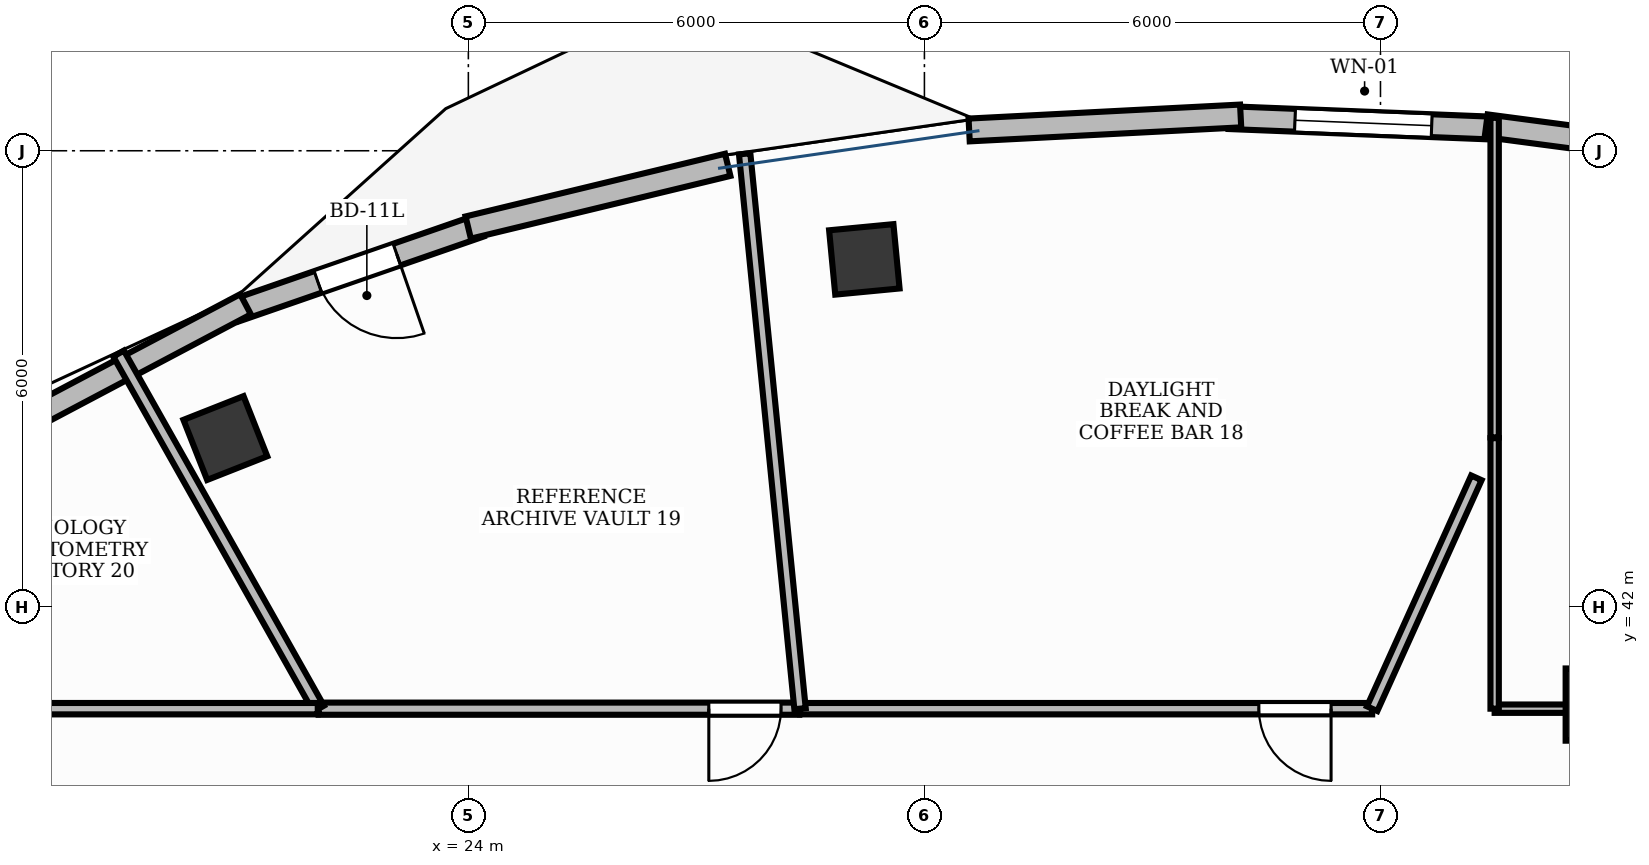
"""IFC4 building model, lengths in metres.
Left out: names, types, materials, properties, quantities, classifications, styles, units other than length and angle.
Written with IfcOpenShell. Run it as: python <this file> out.ifc"""

import sys

from ifc_helpers import new_model, si_unit, direction, frame, frame_2d, origin, origin_2d, place, context, subcontext, project, spatial, rectangle, extrude, element, fill, save


model = new_model("IFC4")
c1 = context("Model", 3, precision=1e-05, world=origin(), true_north=direction((0.0, 1.0)))
c2 = subcontext(c1, "Body", "Model", "MODEL_VIEW")
j1 = project(units=[si_unit("LENGTHUNIT", "METRE"), si_unit("PLANEANGLEUNIT", "RADIAN")], contexts=[c1])
p1 = place(None, origin())
s1 = spatial("IfcSite", under=j1, at=p1, CompositionType="ELEMENT")
p2 = place(p1, origin())
s2 = spatial("IfcBuilding", under=s1, at=p2, CompositionType="ELEMENT")
p3 = place(p2, frame((0.0, 0.0, 256.2)))
s3 = spatial("IfcBuildingStorey", under=s2, at=p3, CompositionType="ELEMENT", Elevation=256.2)
p4 = place(p3, frame((38.911, 40.714, -0.0), z_axis=(0.0, 0.0, 1.0), x_axis=(1.0, 0.0, 0.0)))
e1 = element("IfcColumn", 1, at=p4, inside=s3, PredefinedType="COLUMN", context=c2, shape_type="SweptSolid", body=[
    extrude(rectangle(XDim=0.95, YDim=0.95, at=origin_2d()), origin(), (0.0, 0.0, 1.0), 3.901),
])
for number, where, z_axis, x_axis in (
    (2, (29.21, 46.571, -0.0), (0.0, 0.0, 1.0), (0.995, 0.095, 0.0)),
    (3, (20.803, 44.22, -0.0), (0.0, 0.0, 1.0), (0.93, 0.367, 0.0)),
):
    element("IfcColumn", number, at=place(p3, frame(where, z_axis=z_axis, x_axis=x_axis)), inside=s3, PredefinedType="COLUMN", context=c2, shape_type="SweptSolid", body=[
        extrude(rectangle(XDim=0.85, YDim=0.85, at=origin_2d()), origin(), (0.0, 0.0, 1.0), 3.901),
    ])
p5 = place(p3, frame((37.542, 48.295, 0.0), z_axis=(0.0, 0.0, 1.0), x_axis=(-0.999212491376, 0.039678672827, 0.0)))
e4 = element("IfcWall", 4, at=p5, inside=s3, PredefinedType="STANDARD", context=c2, shape_type="SweptSolid", body=[
    extrude(rectangle(XDim=3.538, YDim=0.3, at=frame_2d((1.769, 0.0))), origin(), (0.0, 0.0, 1.0), 3.9),
])
p6 = place(p5, frame((0.869, 0.0, 0.9)))
e5 = element("IfcOpeningElement", 5, at=p6, cuts=e4, PredefinedType="OPENING", context=c2, shape_type="SweptSolid", body=[
    extrude(rectangle(XDim=1.8, YDim=2.1, at=frame_2d((0.9, 1.05))), frame((0.0, 0.165, 0.0), z_axis=(0.0, -1.0, 0.0), x_axis=(1.0, 0.0, 0.0)), (0.0, 0.0, 1.0), 0.33),
])
p7 = place(p3, frame((24.152, 47.013, 0.0), z_axis=(0.0, 0.0, 1.0), x_axis=(-0.944837969822, -0.327538105849, 0.0)))
e6 = element("IfcWall", 6, at=p7, inside=s3, PredefinedType="STANDARD", context=c2, shape_type="SweptSolid", body=[
    extrude(rectangle(XDim=3.412, YDim=0.3, at=frame_2d((1.706, 0.0))), origin(), (0.0, 0.0, 1.0), 3.9),
])
p8 = place(p7, frame((1.156, 0.0, 0.0)))
e7 = element("IfcOpeningElement", 7, at=p8, cuts=e6, PredefinedType="OPENING", context=c2, shape_type="SweptSolid", body=[
    extrude(rectangle(XDim=1.1, YDim=2.15, at=frame_2d((0.55, 1.075))), frame((0.0, 0.165, 0.0), z_axis=(0.0, -1.0, 0.0), x_axis=(1.0, 0.0, 0.0)), (0.0, 0.0, 1.0), 0.33),
])
p9 = place(p3, frame((40.918, 47.863, 0.0), z_axis=(0.0, 0.0, 1.0), x_axis=(-0.991358046751, 0.131183928672, 0.0)))
e8 = element("IfcWall", 8, at=p9, inside=s3, PredefinedType="STANDARD", context=c2, shape_type="SweptSolid", body=[
    extrude(rectangle(XDim=3.558, YDim=0.3, at=frame_2d((1.779, 0.0))), origin(), (0.0, 0.0, 1.0), 3.9),
])
p10 = place(p3, frame((34.16, 48.458, 0.0), z_axis=(0.0, 0.0, 1.0), x_axis=(-0.998671230657, -0.051534193093, 0.0)))
e9 = element("IfcWall", 9, at=p10, inside=s3, PredefinedType="STANDARD", context=c2, shape_type="SweptSolid", body=[
    extrude(rectangle(XDim=3.577, YDim=0.3, at=frame_2d((1.788, 0.0))), origin(), (0.0, 0.0, 1.0), 3.9),
])
p11 = place(p3, frame((27.412, 47.815, 0.0), z_axis=(0.0, 0.0, 1.0), x_axis=(-0.972025869784, -0.23487381393, 0.0)))
e10 = element("IfcWall", 10, at=p11, inside=s3, PredefinedType="STANDARD", context=c2, shape_type="SweptSolid", body=[
    extrude(rectangle(XDim=3.512, YDim=0.3, at=frame_2d((1.756, 0.0))), origin(), (0.0, 0.0, 1.0), 3.9),
])
p12 = place(p3, frame((21.069, 45.98, 0.0), z_axis=(0.0, 0.0, 1.0), x_axis=(-0.883907649271, -0.467661488216, 0.0)))
e11 = element("IfcWall", 11, at=p12, inside=s3, PredefinedType="STANDARD", context=c2, shape_type="SweptSolid", body=[
    extrude(rectangle(XDim=6.496, YDim=0.3, at=frame_2d((3.248, 0.0))), origin(), (0.0, 0.0, 1.0), 3.9),
])
p13 = place(p3, frame((41.8, 40.66, 0.0), z_axis=(0.0, 0.0, 1.0), x_axis=(-1.0, 0.0, 0.0)))
e12 = element("IfcWall", 12, at=p13, inside=s3, PredefinedType="MOVABLE", context=c2, shape_type="SweptSolid", body=[
    extrude(rectangle(XDim=4.298, YDim=0.11, at=frame_2d((2.149, 0.0))), origin(), (0.0, 0.0, 1.0), 2.22),
])
p14 = place(p13, frame((0.24, 0.0, 0.0)))
e13 = element("IfcOpeningElement", 13, at=p14, cuts=e12, PredefinedType="OPENING", context=c2, shape_type="SweptSolid", body=[
    extrude(rectangle(XDim=0.95, YDim=2.15, at=frame_2d((0.475, 1.075))), frame((0.0, 0.07, 0.0), z_axis=(0.0, -1.0, 0.0), x_axis=(1.0, 0.0, 0.0)), (0.0, 0.0, 1.0), 0.14),
])
p15 = place(p3, frame((35.891, 40.66, 0.0), z_axis=(0.0, 0.0, 1.0), x_axis=(-1.0, 0.0, 0.0)))
e14 = element("IfcWall", 14, at=p15, inside=s3, PredefinedType="PARTITIONING", context=c2, shape_type="SweptSolid", body=[
    extrude(rectangle(XDim=7.527, YDim=0.15, at=frame_2d((3.763, 0.0))), origin(), (0.0, 0.0, 1.0), 2.22),
])
p16 = place(p15, frame((0.541, 0.0, 0.0)))
e15 = element("IfcOpeningElement", 15, at=p16, cuts=e14, PredefinedType="OPENING", context=c2, shape_type="SweptSolid", body=[
    extrude(rectangle(XDim=0.95, YDim=2.15, at=frame_2d((0.475, 1.075))), frame((0.0, 0.09, 0.0), z_axis=(0.0, -1.0, 0.0), x_axis=(1.0, 0.0, 0.0)), (0.0, 0.0, 1.0), 0.18),
])
p17 = place(p3, frame((28.354, 40.66, 0.0), z_axis=(0.0, 0.0, 1.0), x_axis=(-1.0, 0.0, 0.0)))
e16 = element("IfcWall", 16, at=p17, inside=s3, PredefinedType="PARTITIONING", context=c2, shape_type="SweptSolid", body=[
    extrude(rectangle(XDim=6.323, YDim=0.16, at=frame_2d((3.162, 0.0))), origin(), (0.0, 0.0, 1.0), 2.22),
])
p18 = place(p17, frame((0.24, 0.0, 0.0)))
e17 = element("IfcOpeningElement", 17, at=p18, cuts=e16, PredefinedType="OPENING", context=c2, shape_type="SweptSolid", body=[
    extrude(rectangle(XDim=0.95, YDim=2.15, at=frame_2d((0.475, 1.075))), frame((0.0, 0.095, 0.0), z_axis=(0.0, -1.0, 0.0), x_axis=(1.0, 0.0, 0.0)), (0.0, 0.0, 1.0), 0.19),
])
p19 = place(p3, frame((37.502, 44.229, 0.0), z_axis=(0.0, 0.0, 1.0), x_axis=(0.0, 1.0, 0.0)))
e18 = element("IfcWall", 18, at=p19, inside=s3, PredefinedType="MOVABLE", context=c2, shape_type="SweptSolid", body=[
    extrude(rectangle(XDim=4.204, YDim=0.11, at=frame_2d((2.102, 0.0))), origin(), (0.0, 0.0, 1.0), 2.22),
])
p20 = place(p3, frame((37.502, 40.66, 0.0), z_axis=(0.0, 0.0, 1.0), x_axis=(0.0, 1.0, 0.0)))
e19 = element("IfcWall", 19, at=p20, inside=s3, PredefinedType="MOVABLE", context=c2, shape_type="SweptSolid", body=[
    extrude(rectangle(XDim=3.559, YDim=0.11, at=frame_2d((1.78, 0.0))), origin(), (0.0, 0.0, 1.0), 2.22),
])
p21 = place(p3, frame((37.262, 43.697, 0.0), z_axis=(0.0, 0.0, 1.0), x_axis=(-0.411494466198, -0.91141225814, 0.0)))
e20 = element("IfcWall", 20, at=p21, inside=s3, PredefinedType="PARTITIONING", context=c2, shape_type="SweptSolid", body=[
    extrude(rectangle(XDim=3.333, YDim=0.15, at=frame_2d((1.666, 0.0))), origin(), (0.0, 0.0, 1.0), 2.22),
])
p22 = place(p3, frame((28.364, 40.66, 0.0), z_axis=(0.0, 0.0, 1.0), x_axis=(-0.09933896822, 0.995053651515, 0.0)))
e21 = element("IfcWall", 21, at=p22, inside=s3, PredefinedType="PARTITIONING", context=c2, shape_type="SweptSolid", body=[
    extrude(rectangle(XDim=7.336, YDim=0.15, at=frame_2d((3.668, 0.0))), origin(), (0.0, 0.0, 1.0), 2.22),
])
p23 = place(p3, frame((22.031, 40.66, 0.0), z_axis=(0.0, 0.0, 1.0), x_axis=(-0.490903118402, 0.871214169044, 0.0)))
e22 = element("IfcWall", 22, at=p23, inside=s3, PredefinedType="PARTITIONING", context=c2, shape_type="SweptSolid", body=[
    extrude(rectangle(XDim=5.362, YDim=0.16, at=frame_2d((2.681, 0.0))), origin(), (0.0, 0.0, 1.0), 2.22),
])
p24 = place(p3, frame((22.019, 40.66, 0.0), z_axis=(0.0, 0.0, 1.0), x_axis=(-1.0, 0.0, 0.0)))
e23 = element("IfcWall", 23, at=p24, inside=s3, PredefinedType="PARTITIONING", context=c2, shape_type="SweptSolid", body=[
    extrude(rectangle(XDim=4.469, YDim=0.15, at=frame_2d((2.234, 0.0))), origin(), (0.0, 0.0, 1.0), 2.22),
])
p25 = place(p6, origin())
e24 = element("IfcWindow", 24, at=p25, inside=s3, PartitioningType="SINGLE_PANEL", PredefinedType="WINDOW", context=c2, shape_type="SweptSolid", body=[
    extrude(rectangle(XDim=1.8, YDim=2.1, at=frame_2d((0.9, 1.05))), frame((0.0, 0.03, 0.0), z_axis=(0.0, -1.0, 0.0), x_axis=(1.0, 0.0, 0.0)), (0.0, 0.0, 1.0), 0.06),
])
fill(e5, e24)
p26 = place(p8, origin())
e25 = element("IfcDoor", 25, at=p26, inside=s3, OperationType="SINGLE_SWING_LEFT", PredefinedType="DOOR", context=c2, shape_type="SweptSolid", body=[
    extrude(rectangle(XDim=1.1, YDim=2.15, at=frame_2d((0.55, 1.075))), frame((0.0, 0.025, 0.0), z_axis=(0.0, -1.0, 0.0), x_axis=(1.0, 0.0, 0.0)), (0.0, 0.0, 1.0), 0.05),
])
fill(e7, e25)
p27 = place(p16, origin())
e26 = element("IfcDoor", 26, at=p27, inside=s3, OperationType="SINGLE_SWING_LEFT", PredefinedType="DOOR", context=c2, shape_type="SweptSolid", body=[
    extrude(rectangle(XDim=0.95, YDim=2.15, at=frame_2d((0.475, 1.075))), frame((0.0, 0.025, 0.0), z_axis=(0.0, -1.0, 0.0), x_axis=(1.0, 0.0, 0.0)), (0.0, 0.0, 1.0), 0.05),
])
fill(e15, e26)
p28 = place(p18, origin())
e27 = element("IfcDoor", 27, at=p28, inside=s3, OperationType="SINGLE_SWING_RIGHT", PredefinedType="DOOR", context=c2, shape_type="SweptSolid", body=[
    extrude(rectangle(XDim=0.95, YDim=2.15, at=frame_2d((0.475, 1.075))), frame((0.0, 0.025, 0.0), z_axis=(0.0, -1.0, 0.0), x_axis=(1.0, 0.0, 0.0)), (0.0, 0.0, 1.0), 0.05),
])
fill(e17, e27)
save(model, sys.argv[1])
